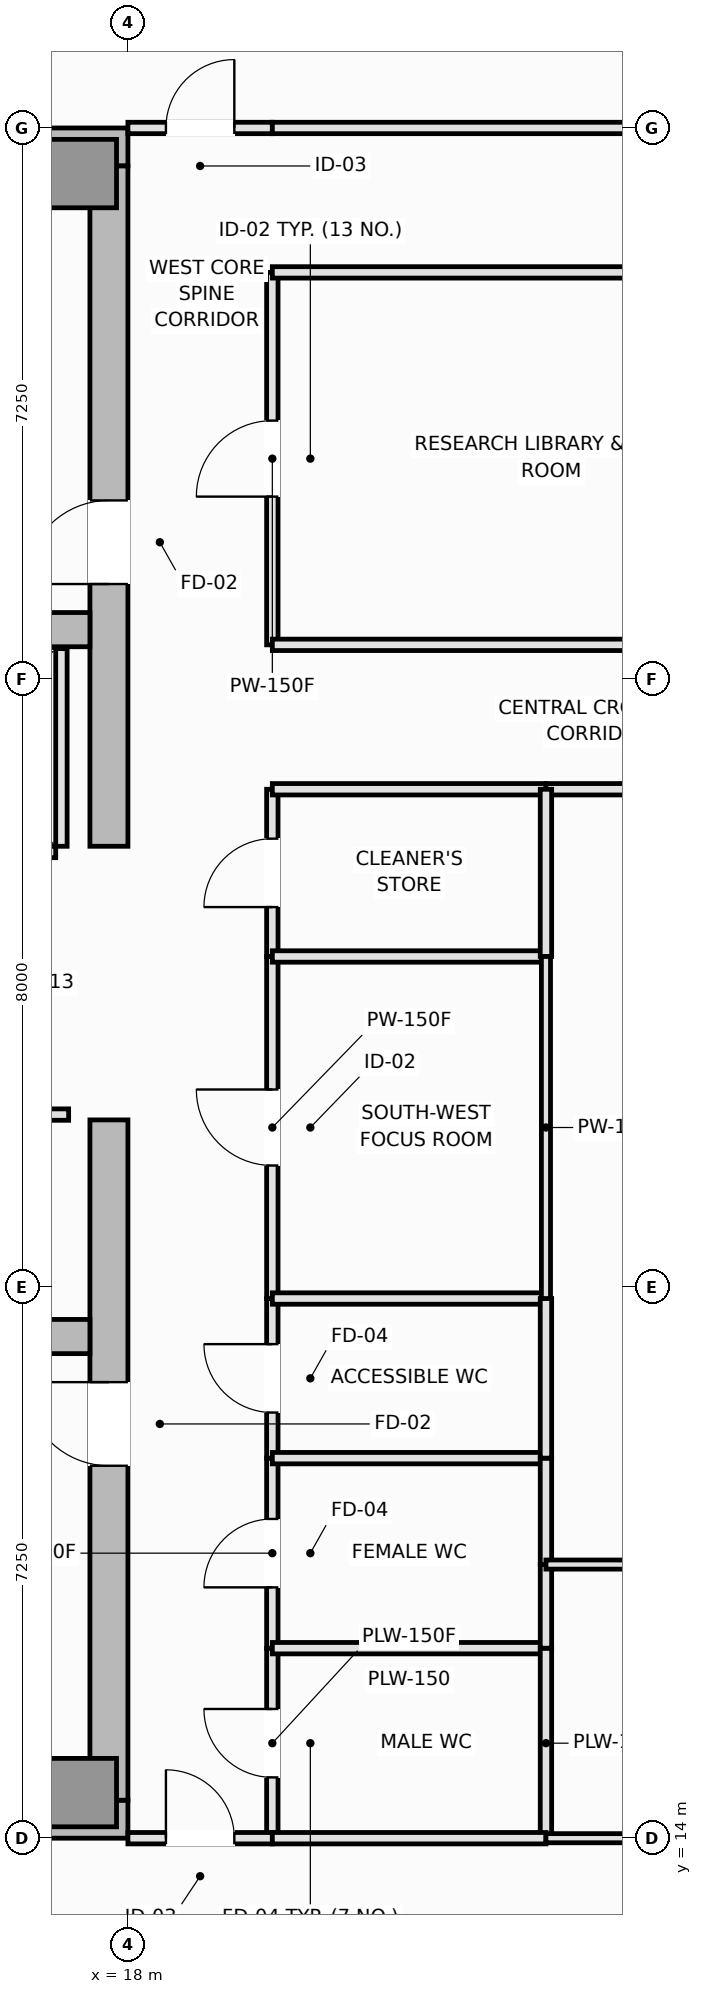
"""IFC4 building model, lengths in metres.
Left out: names, types, materials, properties, quantities, classifications, styles, units other than length and angle.
Written with IfcOpenShell. Run it as: python <this file> out.ifc"""

import sys

from ifc_helpers import new_model, si_unit, direction, frame, frame_2d, origin, origin_2d, place, context, subcontext, project, spatial, rectangle, extrude, element, fill, save


model = new_model("IFC4")
c1 = context("Model", 3, precision=1e-05, world=origin(), true_north=direction((0.0, 1.0)))
c2 = subcontext(c1, "Body", "Model", "MODEL_VIEW")
j1 = project(units=[si_unit("LENGTHUNIT", "METRE"), si_unit("PLANEANGLEUNIT", "RADIAN")], contexts=[c1])
p1 = place(None, origin())
s1 = spatial("IfcSite", under=j1, at=p1, CompositionType="ELEMENT")
p2 = place(p1, origin())
s2 = spatial("IfcBuilding", under=s1, at=p2, CompositionType="ELEMENT")
p3 = place(p2, frame((0.0, 0.0, 281.2)))
s3 = spatial("IfcBuildingStorey", under=s2, at=p3, CompositionType="ELEMENT", Elevation=281.2)
for number, where, z_axis, x_axis in (
    (1, (4.5, 14.25, 0.0), (0.0, 0.0, 1.0), (1.0, 0.0, 0.0)),
    (2, (4.5, 36.25, 0.0), (0.0, 0.0, 1.0), (1.0, 0.0, 0.0)),
):
    element("IfcWall", number, at=place(p3, frame(where, z_axis=z_axis, x_axis=x_axis)), inside=s3, PredefinedType="SHEAR", context=c2, shape_type="SweptSolid", body=[
        extrude(rectangle(XDim=13.5, YDim=0.5, at=frame_2d((6.75, 0.0))), origin(), (0.0, 0.0, 1.0), 3.55),
    ])
p4 = place(p3, frame((17.75, 14.5, 0.0), z_axis=(0.0, 0.0, 1.0), x_axis=(0.0, 1.0, 0.0)))
e3 = element("IfcWall", 3, at=p4, inside=s3, PredefinedType="SHEAR", context=c2, shape_type="SweptSolid", body=[
    extrude(rectangle(XDim=8.95, YDim=0.5, at=frame_2d((4.475, 0.0))), origin(), (0.0, 0.0, 1.0), 3.55),
])
p5 = place(p4, frame((4.4, 0.0, 0.0)))
e4 = element("IfcOpeningElement", 4, at=p5, cuts=e3, PredefinedType="OPENING", context=c2, shape_type="SweptSolid", body=[
    extrude(rectangle(XDim=1.1, YDim=2.15, at=frame_2d((0.55, 1.075))), frame((0.0, 0.26, 0.0), z_axis=(0.0, -1.0, 0.0), x_axis=(1.0, 0.0, 0.0)), (0.0, 0.0, 1.0), 0.52),
])
p6 = place(p3, frame((17.75, 27.05, 0.0), z_axis=(0.0, 0.0, 1.0), x_axis=(0.0, 1.0, 0.0)))
e5 = element("IfcWall", 5, at=p6, inside=s3, PredefinedType="SHEAR", context=c2, shape_type="SweptSolid", body=[
    extrude(rectangle(XDim=8.95, YDim=0.5, at=frame_2d((4.475, 0.0))), origin(), (0.0, 0.0, 1.0), 3.55),
])
p7 = place(p6, frame((3.45, 0.0, 0.0)))
e6 = element("IfcOpeningElement", 6, at=p7, cuts=e5, PredefinedType="OPENING", context=c2, shape_type="SweptSolid", body=[
    extrude(rectangle(XDim=1.1, YDim=2.15, at=frame_2d((0.55, 1.075))), frame((0.0, 0.26, 0.0), z_axis=(0.0, -1.0, 0.0), x_axis=(1.0, 0.0, 0.0)), (0.0, 0.0, 1.0), 0.52),
])
for number, where, z_axis, x_axis in (
    (7, (5.0, 20.6, 0.0), (0.0, 0.0, 1.0), (1.0, 0.0, 0.0)),
    (8, (5.0, 29.9, 0.0), (0.0, 0.0, 1.0), (1.0, 0.0, 0.0)),
):
    element("IfcWall", number, at=place(p3, frame(where, z_axis=z_axis, x_axis=x_axis)), inside=s3, PredefinedType="SHEAR", context=c2, shape_type="SweptSolid", body=[
        extrude(rectangle(XDim=12.5, YDim=0.45, at=frame_2d((6.25, 0.0))), origin(), (0.0, 0.0, 1.0), 3.55),
    ])
for number, where, z_axis, x_axis in (
    (9, (17.4, 14.6, 0.0), (0.0, 0.0, 1.0), (1.0, 0.0, 0.0)),
    (10, (17.4, 35.9, 0.0), (0.0, 0.0, 1.0), (1.0, 0.0, 0.0)),
):
    element("IfcColumn", number, at=place(p3, frame(where, z_axis=z_axis, x_axis=x_axis)), inside=s3, PredefinedType="PILASTER", context=c2, shape_type="SweptSolid", body=[
        extrude(rectangle(XDim=0.9, YDim=0.9, at=origin_2d()), origin(), (0.0, 0.0, 1.0), 3.55),
    ])
p8 = place(p3, frame((14.5, 26.975, 0.0), z_axis=(0.0, 0.0, 1.0), x_axis=(1.0, 0.0, 0.0)))
e11 = element("IfcWall", 11, at=p8, inside=s3, PredefinedType="PARTITIONING", context=c2, shape_type="SweptSolid", body=[
    extrude(rectangle(XDim=2.55, YDim=0.15, at=frame_2d((1.275, 0.0))), origin(), (0.0, 0.0, 1.0), 3.39),
])
p9 = place(p8, frame((0.625, 0.0, 0.0)))
e12 = element("IfcOpeningElement", 12, at=p9, cuts=e11, PredefinedType="OPENING", context=c2, shape_type="SweptSolid", body=[
    extrude(rectangle(XDim=1.3, YDim=2.2, at=frame_2d((0.65, 1.1))), frame((0.0, 0.085, 0.0), z_axis=(0.0, -1.0, 0.0), x_axis=(1.0, 0.0, 0.0)), (0.0, 0.0, 1.0), 0.17),
])
p10 = place(p3, frame((17.125, 27.05, 0.0), z_axis=(0.0, 0.0, 1.0), x_axis=(0.0, 1.0, 0.0)))
e13 = element("IfcWall", 13, at=p10, inside=s3, PredefinedType="PARTITIONING", context=c2, shape_type="SweptSolid", body=[
    extrude(rectangle(XDim=2.6, YDim=0.15, at=frame_2d((1.3, 0.0))), origin(), (0.0, 0.0, 1.0), 3.39),
])
p11 = place(p3, frame((14.33, 23.52, 0.0), z_axis=(0.0, 0.0, 1.0), x_axis=(1.0, 0.0, 0.0)))
e14 = element("IfcWall", 14, at=p11, inside=s3, PredefinedType="PARTITIONING", context=c2, shape_type="SweptSolid", body=[
    extrude(rectangle(XDim=2.89, YDim=0.15, at=frame_2d((1.445, 0.0))), origin(), (0.0, 0.0, 1.0), 3.39),
])
p12 = place(p11, frame((1.053, 0.0, 0.0)))
e15 = element("IfcOpeningElement", 15, at=p12, cuts=e14, PredefinedType="OPENING", context=c2, shape_type="SweptSolid", body=[
    extrude(rectangle(XDim=0.9, YDim=2.1, at=frame_2d((0.45, 1.05))), frame((0.0, 0.085, 0.0), z_axis=(0.0, -1.0, 0.0), x_axis=(1.0, 0.0, 0.0)), (0.0, 0.0, 1.0), 0.17),
])
p13 = place(p3, frame((19.9, 29.7, 0.0), z_axis=(0.0, 0.0, 1.0), x_axis=(0.0, 1.0, 0.0)))
e16 = element("IfcWall", 16, at=p13, inside=s3, PredefinedType="PARTITIONING", context=c2, shape_type="SweptSolid", body=[
    extrude(rectangle(XDim=4.9, YDim=0.15, at=frame_2d((2.45, 0.0))), origin(), (0.0, 0.0, 1.0), 3.39),
])
p14 = place(p13, frame((1.95, 0.0, 0.0)))
e17 = element("IfcOpeningElement", 17, at=p14, cuts=e16, PredefinedType="OPENING", context=c2, shape_type="SweptSolid", body=[
    extrude(rectangle(XDim=1.0, YDim=2.15, at=frame_2d((0.5, 1.075))), frame((0.0, 0.085, 0.0), z_axis=(0.0, -1.0, 0.0), x_axis=(1.0, 0.0, 0.0)), (0.0, 0.0, 1.0), 0.17),
])
p15 = place(p3, frame((19.9, 14.0, 0.0), z_axis=(0.0, 0.0, 1.0), x_axis=(0.0, 1.0, 0.0)))
e18 = element("IfcWall", 18, at=p15, inside=s3, PredefinedType="PLUMBINGWALL", context=c2, shape_type="SweptSolid", body=[
    extrude(rectangle(XDim=2.5, YDim=0.15, at=frame_2d((1.25, 0.0))), origin(), (0.0, 0.0, 1.0), 3.39),
])
p16 = place(p15, frame((0.8, 0.0, 0.0)))
e19 = element("IfcOpeningElement", 19, at=p16, cuts=e18, PredefinedType="OPENING", context=c2, shape_type="SweptSolid", body=[
    extrude(rectangle(XDim=0.9, YDim=2.1, at=frame_2d((0.45, 1.05))), frame((0.0, 0.085, 0.0), z_axis=(0.0, -1.0, 0.0), x_axis=(1.0, 0.0, 0.0)), (0.0, 0.0, 1.0), 0.17),
])
p17 = place(p3, frame((19.9, 16.5, 0.0), z_axis=(0.0, 0.0, 1.0), x_axis=(0.0, 1.0, 0.0)))
e20 = element("IfcWall", 20, at=p17, inside=s3, PredefinedType="PLUMBINGWALL", context=c2, shape_type="SweptSolid", body=[
    extrude(rectangle(XDim=2.5, YDim=0.15, at=frame_2d((1.25, 0.0))), origin(), (0.0, 0.0, 1.0), 3.39),
])
p18 = place(p17, frame((0.8, 0.0, 0.0)))
e21 = element("IfcOpeningElement", 21, at=p18, cuts=e20, PredefinedType="OPENING", context=c2, shape_type="SweptSolid", body=[
    extrude(rectangle(XDim=0.9, YDim=2.1, at=frame_2d((0.45, 1.05))), frame((0.0, 0.085, 0.0), z_axis=(0.0, -1.0, 0.0), x_axis=(1.0, 0.0, 0.0)), (0.0, 0.0, 1.0), 0.17),
])
p19 = place(p3, frame((19.9, 19.0, 0.0), z_axis=(0.0, 0.0, 1.0), x_axis=(0.0, 1.0, 0.0)))
e22 = element("IfcWall", 22, at=p19, inside=s3, PredefinedType="PLUMBINGWALL", context=c2, shape_type="SweptSolid", body=[
    extrude(rectangle(XDim=2.1, YDim=0.15, at=frame_2d((1.05, 0.0))), origin(), (0.0, 0.0, 1.0), 3.39),
])
p20 = place(p19, frame((0.6, 0.0, 0.0)))
e23 = element("IfcOpeningElement", 23, at=p20, cuts=e22, PredefinedType="OPENING", context=c2, shape_type="SweptSolid", body=[
    extrude(rectangle(XDim=0.9, YDim=2.1, at=frame_2d((0.45, 1.05))), frame((0.0, 0.085, 0.0), z_axis=(0.0, -1.0, 0.0), x_axis=(1.0, 0.0, 0.0)), (0.0, 0.0, 1.0), 0.17),
])
p21 = place(p3, frame((19.9, 25.6, 0.0), z_axis=(0.0, 0.0, 1.0), x_axis=(0.0, 1.0, 0.0)))
e24 = element("IfcWall", 24, at=p21, inside=s3, PredefinedType="PLUMBINGWALL", context=c2, shape_type="SweptSolid", body=[
    extrude(rectangle(XDim=2.2, YDim=0.15, at=frame_2d((1.1, 0.0))), origin(), (0.0, 0.0, 1.0), 3.39),
])
p22 = place(p21, frame((0.65, 0.0, 0.0)))
e25 = element("IfcOpeningElement", 25, at=p22, cuts=e24, PredefinedType="OPENING", context=c2, shape_type="SweptSolid", body=[
    extrude(rectangle(XDim=0.9, YDim=2.1, at=frame_2d((0.45, 1.05))), frame((0.0, 0.085, 0.0), z_axis=(0.0, -1.0, 0.0), x_axis=(1.0, 0.0, 0.0)), (0.0, 0.0, 1.0), 0.17),
])
p23 = place(p3, frame((19.9, 21.1, 0.0), z_axis=(0.0, 0.0, 1.0), x_axis=(0.0, 1.0, 0.0)))
e26 = element("IfcWall", 26, at=p23, inside=s3, PredefinedType="PARTITIONING", context=c2, shape_type="SweptSolid", body=[
    extrude(rectangle(XDim=4.5, YDim=0.15, at=frame_2d((2.25, 0.0))), origin(), (0.0, 0.0, 1.0), 3.39),
])
p24 = place(p23, frame((1.75, 0.0, 0.0)))
e27 = element("IfcOpeningElement", 27, at=p24, cuts=e26, PredefinedType="OPENING", context=c2, shape_type="SweptSolid", body=[
    extrude(rectangle(XDim=1.0, YDim=2.15, at=frame_2d((0.5, 1.075))), frame((0.0, 0.085, 0.0), z_axis=(0.0, -1.0, 0.0), x_axis=(1.0, 0.0, 0.0)), (0.0, 0.0, 1.0), 0.17),
])
p25 = place(p3, frame((18.0, 14.0, 0.0), z_axis=(0.0, 0.0, 1.0), x_axis=(1.0, 0.0, 0.0)))
e28 = element("IfcWall", 28, at=p25, inside=s3, PredefinedType="PARTITIONING", context=c2, shape_type="SweptSolid", body=[
    extrude(rectangle(XDim=1.9, YDim=0.15, at=frame_2d((0.95, 0.0))), origin(), (0.0, 0.0, 1.0), 3.39),
])
p26 = place(p25, frame((0.5, 0.0, 0.0)))
e29 = element("IfcOpeningElement", 29, at=p26, cuts=e28, PredefinedType="OPENING", context=c2, shape_type="SweptSolid", body=[
    extrude(rectangle(XDim=0.9, YDim=2.1, at=frame_2d((0.45, 1.05))), frame((0.0, 0.085, 0.0), z_axis=(0.0, -1.0, 0.0), x_axis=(1.0, 0.0, 0.0)), (0.0, 0.0, 1.0), 0.17),
])
p27 = place(p3, frame((18.0, 36.5, 0.0), z_axis=(0.0, 0.0, 1.0), x_axis=(1.0, 0.0, 0.0)))
e30 = element("IfcWall", 30, at=p27, inside=s3, PredefinedType="PARTITIONING", context=c2, shape_type="SweptSolid", body=[
    extrude(rectangle(XDim=1.9, YDim=0.15, at=frame_2d((0.95, 0.0))), origin(), (0.0, 0.0, 1.0), 3.39),
])
p28 = place(p27, frame((0.5, 0.0, 0.0)))
e31 = element("IfcOpeningElement", 31, at=p28, cuts=e30, PredefinedType="OPENING", context=c2, shape_type="SweptSolid", body=[
    extrude(rectangle(XDim=0.9, YDim=2.1, at=frame_2d((0.45, 1.05))), frame((0.0, 0.085, 0.0), z_axis=(0.0, -1.0, 0.0), x_axis=(1.0, 0.0, 0.0)), (0.0, 0.0, 1.0), 0.17),
])
p29 = place(p3, frame((19.9, 29.7, 0.0), z_axis=(0.0, 0.0, 1.0), x_axis=(1.0, 0.0, 0.0)))
e32 = element("IfcWall", 32, at=p29, inside=s3, PredefinedType="PARTITIONING", context=c2, shape_type="SweptSolid", body=[
    extrude(rectangle(XDim=6.89, YDim=0.15, at=frame_2d((3.445, 0.0))), origin(), (0.0, 0.0, 1.0), 3.39),
])
p30 = place(p3, frame((19.9, 27.8, 0.0), z_axis=(0.0, 0.0, 1.0), x_axis=(1.0, 0.0, 0.0)))
e33 = element("IfcWall", 33, at=p30, inside=s3, PredefinedType="PLUMBINGWALL", context=c2, shape_type="SweptSolid", body=[
    extrude(rectangle(XDim=3.6, YDim=0.15, at=frame_2d((1.8, 0.0))), origin(), (0.0, 0.0, 1.0), 3.39),
])
p31 = place(p3, frame((23.5, 27.8, 0.0), z_axis=(0.0, 0.0, 1.0), x_axis=(1.0, 0.0, 0.0)))
e34 = element("IfcWall", 34, at=p31, inside=s3, PredefinedType="PARTITIONING", context=c2, shape_type="SweptSolid", body=[
    extrude(rectangle(XDim=12.8, YDim=0.15, at=frame_2d((6.4, 0.0))), origin(), (0.0, 0.0, 1.0), 3.39),
])
p32 = place(p31, frame((5.9, 0.0, 0.0)))
e35 = element("IfcOpeningElement", 35, at=p32, cuts=e34, PredefinedType="OPENING", context=c2, shape_type="SweptSolid", body=[
    extrude(rectangle(XDim=1.0, YDim=2.15, at=frame_2d((0.5, 1.075))), frame((0.0, 0.085, 0.0), z_axis=(0.0, -1.0, 0.0), x_axis=(1.0, 0.0, 0.0)), (0.0, 0.0, 1.0), 0.17),
])
p33 = place(p3, frame((19.9, 34.6, 0.0), z_axis=(0.0, 0.0, 1.0), x_axis=(1.0, 0.0, 0.0)))
e36 = element("IfcWall", 36, at=p33, inside=s3, PredefinedType="PARTITIONING", context=c2, shape_type="SweptSolid", body=[
    extrude(rectangle(XDim=6.89, YDim=0.15, at=frame_2d((3.445, 0.0))), origin(), (0.0, 0.0, 1.0), 3.39),
])
p34 = place(p3, frame((19.9, 36.5, 0.0), z_axis=(0.0, 0.0, 1.0), x_axis=(1.0, 0.0, 0.0)))
e37 = element("IfcWall", 37, at=p34, inside=s3, PredefinedType="PARTITIONING", context=c2, shape_type="SweptSolid", body=[
    extrude(rectangle(XDim=9.9, YDim=0.15, at=frame_2d((4.95, 0.0))), origin(), (0.0, 0.0, 1.0), 3.39),
])
p35 = place(p3, frame((19.9, 16.5, 0.0), z_axis=(0.0, 0.0, 1.0), x_axis=(1.0, 0.0, 0.0)))
e38 = element("IfcWall", 38, at=p35, inside=s3, PredefinedType="PLUMBINGWALL", context=c2, shape_type="SweptSolid", body=[
    extrude(rectangle(XDim=3.6, YDim=0.15, at=frame_2d((1.8, 0.0))), origin(), (0.0, 0.0, 1.0), 3.39),
])
p36 = place(p3, frame((23.5, 14.0, 0.0), z_axis=(0.0, 0.0, 1.0), x_axis=(0.0, 1.0, 0.0)))
e39 = element("IfcWall", 39, at=p36, inside=s3, PredefinedType="PLUMBINGWALL", context=c2, shape_type="SweptSolid", body=[
    extrude(rectangle(XDim=2.5, YDim=0.15, at=frame_2d((1.25, 0.0))), origin(), (0.0, 0.0, 1.0), 3.39),
])
for number, where, z_axis, x_axis in (
    (40, (19.9, 14.0, 0.0), (0.0, 0.0, 1.0), (1.0, 0.0, 0.0)),
    (41, (19.9, 19.0, 0.0), (0.0, 0.0, 1.0), (1.0, 0.0, 0.0)),
):
    element("IfcWall", number, at=place(p3, frame(where, z_axis=z_axis, x_axis=x_axis)), inside=s3, PredefinedType="PLUMBINGWALL", context=c2, shape_type="SweptSolid", body=[
        extrude(rectangle(XDim=3.6, YDim=0.15, at=frame_2d((1.8, 0.0))), origin(), (0.0, 0.0, 1.0), 3.39),
    ])
p37 = place(p3, frame((23.5, 16.5, 0.0), z_axis=(0.0, 0.0, 1.0), x_axis=(0.0, 1.0, 0.0)))
e42 = element("IfcWall", 42, at=p37, inside=s3, PredefinedType="PLUMBINGWALL", context=c2, shape_type="SweptSolid", body=[
    extrude(rectangle(XDim=1.1, YDim=0.15, at=frame_2d((0.55, 0.0))), origin(), (0.0, 0.0, 1.0), 3.39),
])
p38 = place(p3, frame((23.5, 17.6, 0.0), z_axis=(0.0, 0.0, 1.0), x_axis=(0.0, 1.0, 0.0)))
e43 = element("IfcWall", 43, at=p38, inside=s3, PredefinedType="PLUMBINGWALL", context=c2, shape_type="SweptSolid", body=[
    extrude(rectangle(XDim=1.4, YDim=0.15, at=frame_2d((0.7, 0.0))), origin(), (0.0, 0.0, 1.0), 3.39),
])
p39 = place(p3, frame((19.9, 21.1, 0.0), z_axis=(0.0, 0.0, 1.0), x_axis=(1.0, 0.0, 0.0)))
e44 = element("IfcWall", 44, at=p39, inside=s3, PredefinedType="PLUMBINGWALL", context=c2, shape_type="SweptSolid", body=[
    extrude(rectangle(XDim=3.6, YDim=0.15, at=frame_2d((1.8, 0.0))), origin(), (0.0, 0.0, 1.0), 3.39),
])
p40 = place(p3, frame((23.5, 19.0, 0.0), z_axis=(0.0, 0.0, 1.0), x_axis=(0.0, 1.0, 0.0)))
e45 = element("IfcWall", 45, at=p40, inside=s3, PredefinedType="PLUMBINGWALL", context=c2, shape_type="SweptSolid", body=[
    extrude(rectangle(XDim=2.1, YDim=0.15, at=frame_2d((1.05, 0.0))), origin(), (0.0, 0.0, 1.0), 3.39),
])
p41 = place(p3, frame((19.9, 25.6, 0.0), z_axis=(0.0, 0.0, 1.0), x_axis=(1.0, 0.0, 0.0)))
e46 = element("IfcWall", 46, at=p41, inside=s3, PredefinedType="PLUMBINGWALL", context=c2, shape_type="SweptSolid", body=[
    extrude(rectangle(XDim=3.6, YDim=0.15, at=frame_2d((1.8, 0.0))), origin(), (0.0, 0.0, 1.0), 3.39),
])
p42 = place(p3, frame((23.5, 25.6, 0.0), z_axis=(0.0, 0.0, 1.0), x_axis=(0.0, 1.0, 0.0)))
e47 = element("IfcWall", 47, at=p42, inside=s3, PredefinedType="PLUMBINGWALL", context=c2, shape_type="SweptSolid", body=[
    extrude(rectangle(XDim=2.2, YDim=0.15, at=frame_2d((1.1, 0.0))), origin(), (0.0, 0.0, 1.0), 3.39),
])
p43 = place(p3, frame((23.5, 21.1, 0.0), z_axis=(0.0, 0.0, 1.0), x_axis=(0.0, 1.0, 0.0)))
e48 = element("IfcWall", 48, at=p43, inside=s3, PredefinedType="PARTITIONING", context=c2, shape_type="SweptSolid", body=[
    extrude(rectangle(XDim=4.5, YDim=0.12, at=frame_2d((2.25, 0.0))), origin(), (0.0, 0.0, 1.0), 3.39),
])
for number, where, z_axis, x_axis in (
    (49, (23.5, 17.6, 0.0), (0.0, 0.0, 1.0), (1.0, 0.0, 0.0)),
    (50, (23.5, 14.0, 0.0), (0.0, 0.0, 1.0), (1.0, 0.0, 0.0)),
):
    element("IfcWall", number, at=place(p3, frame(where, z_axis=z_axis, x_axis=x_axis)), inside=s3, PredefinedType="PARTITIONING", context=c2, shape_type="SweptSolid", body=[
        extrude(rectangle(XDim=12.8, YDim=0.12, at=frame_2d((6.4, 0.0))), origin(), (0.0, 0.0, 1.0), 3.39),
    ])
p44 = place(p5, origin())
e51 = element("IfcDoor", 51, at=p44, inside=s3, OperationType="SINGLE_SWING_RIGHT", PredefinedType="DOOR", context=c2, shape_type="SweptSolid", body=[
    extrude(rectangle(XDim=1.1, YDim=2.15, at=frame_2d((0.55, 1.075))), frame((0.0, 0.025, 0.0), z_axis=(0.0, -1.0, 0.0), x_axis=(1.0, 0.0, 0.0)), (0.0, 0.0, 1.0), 0.05),
])
fill(e4, e51)
p45 = place(p7, origin())
e52 = element("IfcDoor", 52, at=p45, inside=s3, OperationType="SINGLE_SWING_LEFT", PredefinedType="DOOR", context=c2, shape_type="SweptSolid", body=[
    extrude(rectangle(XDim=1.1, YDim=2.15, at=frame_2d((0.55, 1.075))), frame((0.0, 0.025, 0.0), z_axis=(0.0, -1.0, 0.0), x_axis=(1.0, 0.0, 0.0)), (0.0, 0.0, 1.0), 0.05),
])
fill(e6, e52)
p46 = place(p14, origin())
e53 = element("IfcDoor", 53, at=p46, inside=s3, OperationType="SINGLE_SWING_LEFT", PredefinedType="DOOR", context=c2, shape_type="SweptSolid", body=[
    extrude(rectangle(XDim=1.0, YDim=2.15, at=frame_2d((0.5, 1.075))), frame((0.0, 0.025, 0.0), z_axis=(0.0, -1.0, 0.0), x_axis=(1.0, 0.0, 0.0)), (0.0, 0.0, 1.0), 0.05),
])
fill(e17, e53)
p47 = place(p16, origin())
e54 = element("IfcDoor", 54, at=p47, inside=s3, OperationType="SINGLE_SWING_RIGHT", PredefinedType="DOOR", context=c2, shape_type="SweptSolid", body=[
    extrude(rectangle(XDim=0.9, YDim=2.1, at=frame_2d((0.45, 1.05))), frame((0.0, 0.025, 0.0), z_axis=(0.0, -1.0, 0.0), x_axis=(1.0, 0.0, 0.0)), (0.0, 0.0, 1.0), 0.05),
])
fill(e19, e54)
p48 = place(p18, origin())
e55 = element("IfcDoor", 55, at=p48, inside=s3, OperationType="SINGLE_SWING_LEFT", PredefinedType="DOOR", context=c2, shape_type="SweptSolid", body=[
    extrude(rectangle(XDim=0.9, YDim=2.1, at=frame_2d((0.45, 1.05))), frame((0.0, 0.025, 0.0), z_axis=(0.0, -1.0, 0.0), x_axis=(1.0, 0.0, 0.0)), (0.0, 0.0, 1.0), 0.05),
])
fill(e21, e55)
p49 = place(p20, origin())
e56 = element("IfcDoor", 56, at=p49, inside=s3, OperationType="SINGLE_SWING_RIGHT", PredefinedType="DOOR", context=c2, shape_type="SweptSolid", body=[
    extrude(rectangle(XDim=0.9, YDim=2.1, at=frame_2d((0.45, 1.05))), frame((0.0, 0.025, 0.0), z_axis=(0.0, -1.0, 0.0), x_axis=(1.0, 0.0, 0.0)), (0.0, 0.0, 1.0), 0.05),
])
fill(e23, e56)
p50 = place(p22, origin())
e57 = element("IfcDoor", 57, at=p50, inside=s3, OperationType="SINGLE_SWING_LEFT", PredefinedType="DOOR", context=c2, shape_type="SweptSolid", body=[
    extrude(rectangle(XDim=0.9, YDim=2.1, at=frame_2d((0.45, 1.05))), frame((0.0, 0.025, 0.0), z_axis=(0.0, -1.0, 0.0), x_axis=(1.0, 0.0, 0.0)), (0.0, 0.0, 1.0), 0.05),
])
fill(e25, e57)
p51 = place(p24, origin())
e58 = element("IfcDoor", 58, at=p51, inside=s3, OperationType="SINGLE_SWING_RIGHT", PredefinedType="DOOR", context=c2, shape_type="SweptSolid", body=[
    extrude(rectangle(XDim=1.0, YDim=2.15, at=frame_2d((0.5, 1.075))), frame((0.0, 0.025, 0.0), z_axis=(0.0, -1.0, 0.0), x_axis=(1.0, 0.0, 0.0)), (0.0, 0.0, 1.0), 0.05),
])
fill(e27, e58)
p52 = place(p26, origin())
e59 = element("IfcDoor", 59, at=p52, inside=s3, OperationType="SINGLE_SWING_LEFT", PredefinedType="DOOR", context=c2, shape_type="SweptSolid", body=[
    extrude(rectangle(XDim=0.9, YDim=2.1, at=frame_2d((0.45, 1.05))), frame((0.0, 0.025, 0.0), z_axis=(0.0, -1.0, 0.0), x_axis=(1.0, 0.0, 0.0)), (0.0, 0.0, 1.0), 0.05),
])
fill(e29, e59)
p53 = place(p28, origin())
e60 = element("IfcDoor", 60, at=p53, inside=s3, OperationType="SINGLE_SWING_RIGHT", PredefinedType="DOOR", context=c2, shape_type="SweptSolid", body=[
    extrude(rectangle(XDim=0.9, YDim=2.1, at=frame_2d((0.45, 1.05))), frame((0.0, 0.025, 0.0), z_axis=(0.0, -1.0, 0.0), x_axis=(1.0, 0.0, 0.0)), (0.0, 0.0, 1.0), 0.05),
])
fill(e31, e60)
save(model, sys.argv[1])
